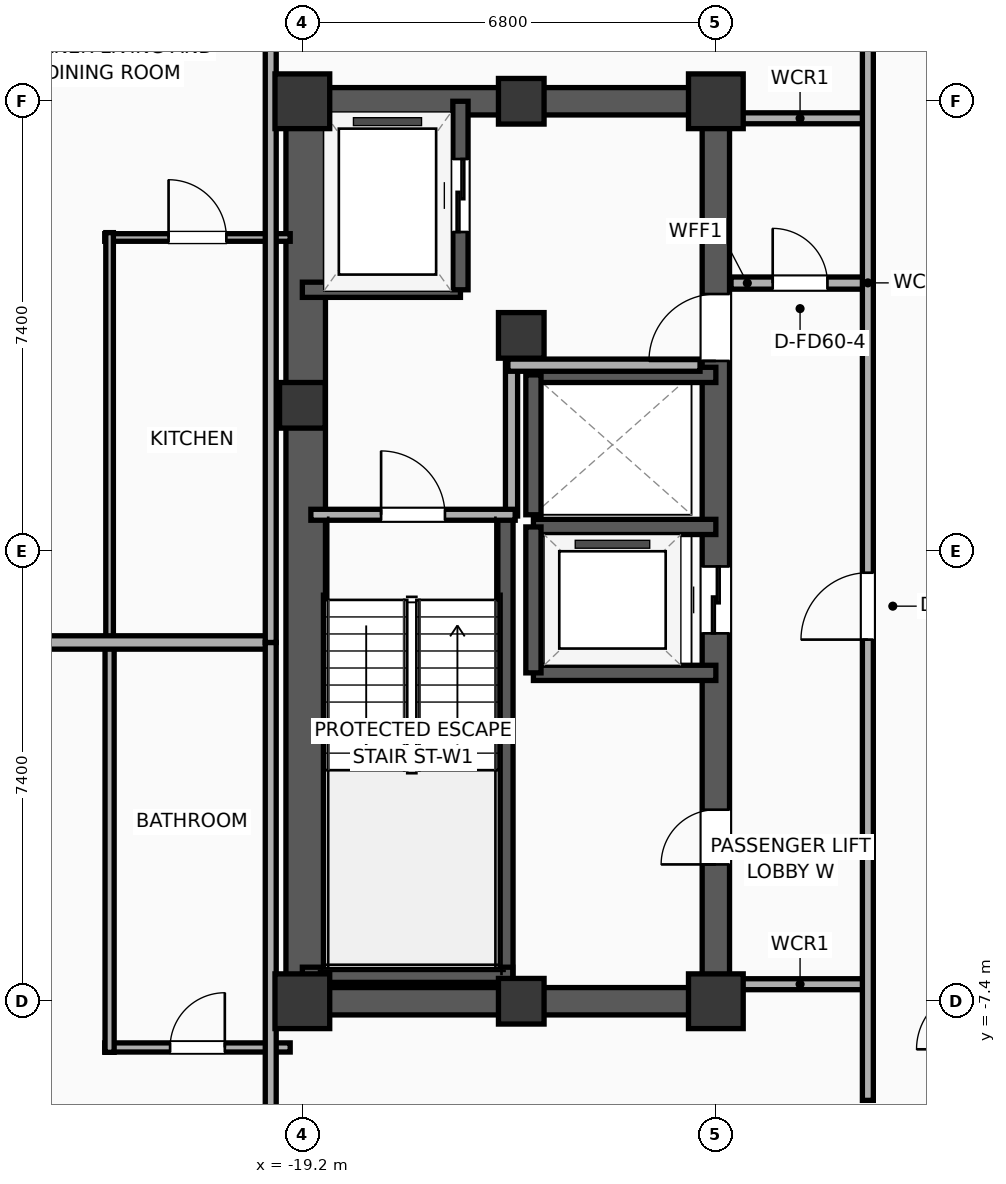
"""IFC4 building model, lengths in metres.
Left out: names, types, materials, properties, quantities, classifications, styles, units other than length and angle.
Written with IfcOpenShell. Run it as: python <this file> out.ifc"""

import sys

from ifc_helpers import new_model, si_unit, direction, frame, frame_2d, origin, origin_2d, place, context, subcontext, project, spatial, rectangle, extrude, element, fill, save


model = new_model("IFC4")
c1 = context("Model", 3, precision=1e-05, world=origin(), true_north=direction((0.0, 1.0)))
c2 = subcontext(c1, "Body", "Model", "MODEL_VIEW")
j1 = project(units=[si_unit("LENGTHUNIT", "METRE"), si_unit("PLANEANGLEUNIT", "RADIAN")], contexts=[c1])
p1 = place(None, origin())
s1 = spatial("IfcSite", under=j1, at=p1, CompositionType="ELEMENT")
p2 = place(p1, origin())
s2 = spatial("IfcBuilding", under=s1, at=p2, CompositionType="ELEMENT")
p3 = place(p2, frame((0.0, 0.0, 159.9)))
s3 = spatial("IfcBuildingStorey", under=s2, at=p3, CompositionType="ELEMENT", Elevation=159.9)
p4 = place(p3, frame((-19.2, -7.4, 0.0), z_axis=(0.0, 0.0, 1.0), x_axis=(1.0, 0.0, 0.0)))
e1 = element("IfcColumn", 1, at=p4, inside=s3, PredefinedType="COLUMN", context=c2, shape_type="SweptSolid", body=[
    extrude(rectangle(XDim=0.9, YDim=0.9, at=origin_2d()), origin(), (0.0, 0.0, 1.0), 3.9),
])
p5 = place(p3, frame((-19.2, 2.4, 0.0), z_axis=(0.0, 0.0, 1.0), x_axis=(1.0, 0.0, 0.0)))
e2 = element("IfcColumn", 2, at=p5, inside=s3, PredefinedType="COLUMN", context=c2, shape_type="SweptSolid", body=[
    extrude(rectangle(XDim=0.75, YDim=0.75, at=origin_2d()), origin(), (0.0, 0.0, 1.0), 3.9),
])
p6 = place(p3, frame((-19.2, 7.4, 0.0), z_axis=(0.0, 0.0, 1.0), x_axis=(1.0, 0.0, 0.0)))
e3 = element("IfcColumn", 3, at=p6, inside=s3, PredefinedType="COLUMN", context=c2, shape_type="SweptSolid", body=[
    extrude(rectangle(XDim=0.9, YDim=0.9, at=origin_2d()), origin(), (0.0, 0.0, 1.0), 3.9),
])
for number, where, z_axis, x_axis in (
    (4, (-15.6, -7.4, 0.0), (0.0, 0.0, 1.0), (1.0, 0.0, 0.0)),
    (5, (-15.6, 7.4, 0.0), (0.0, 0.0, 1.0), (1.0, 0.0, 0.0)),
):
    element("IfcColumn", number, at=place(p3, frame(where, z_axis=z_axis, x_axis=x_axis)), inside=s3, PredefinedType="COLUMN", context=c2, shape_type="SweptSolid", body=[
        extrude(rectangle(XDim=0.75, YDim=0.75, at=origin_2d()), origin(), (0.0, 0.0, 1.0), 3.9),
    ])
p7 = place(p3, frame((-12.4, -7.4, 0.0), z_axis=(0.0, 0.0, 1.0), x_axis=(1.0, 0.0, 0.0)))
e6 = element("IfcColumn", 6, at=p7, inside=s3, PredefinedType="COLUMN", context=c2, shape_type="SweptSolid", body=[
    extrude(rectangle(XDim=0.9, YDim=0.9, at=origin_2d()), origin(), (0.0, 0.0, 1.0), 3.9),
])
p8 = place(p3, frame((-15.6, 3.55, 0.0), z_axis=(0.0, 0.0, 1.0), x_axis=(1.0, 0.0, 0.0)))
e7 = element("IfcColumn", 7, at=p8, inside=s3, PredefinedType="COLUMN", context=c2, shape_type="SweptSolid", body=[
    extrude(rectangle(XDim=0.75, YDim=0.75, at=origin_2d()), origin(), (0.0, 0.0, 1.0), 3.9),
])
p9 = place(p3, frame((-12.4, 7.4, 0.0), z_axis=(0.0, 0.0, 1.0), x_axis=(1.0, 0.0, 0.0)))
e8 = element("IfcColumn", 8, at=p9, inside=s3, PredefinedType="COLUMN", context=c2, shape_type="SweptSolid", body=[
    extrude(rectangle(XDim=0.9, YDim=0.9, at=origin_2d()), origin(), (0.0, 0.0, 1.0), 3.9),
])
for number, where, z_axis, x_axis in (
    (9, (-19.425, -7.4, 0.0), (0.0, 0.0, 1.0), (1.0, 0.0, 0.0)),
    (10, (-19.425, 7.4, 0.0), (0.0, 0.0, 1.0), (1.0, 0.0, 0.0)),
):
    element("IfcWall", number, at=place(p3, frame(where, z_axis=z_axis, x_axis=x_axis)), inside=s3, PredefinedType="SHEAR", context=c2, shape_type="SweptSolid", body=[
        extrude(rectangle(XDim=7.25, YDim=0.45, at=frame_2d((3.625, 0.0))), origin(), (0.0, 0.0, 1.0), 3.65),
    ])
p10 = place(p3, frame((-19.145, -7.4, 0.0), z_axis=(0.0, 0.0, 1.0), x_axis=(0.0, 1.0, 0.0)))
e11 = element("IfcWall", 11, at=p10, inside=s3, PredefinedType="SHEAR", context=c2, shape_type="SweptSolid", body=[
    extrude(rectangle(XDim=14.8, YDim=0.65, at=frame_2d((7.4, 0.0))), origin(), (0.0, 0.0, 1.0), 3.65),
])
p11 = place(p3, frame((-12.4, -7.4, 0.0), z_axis=(0.0, 0.0, 1.0), x_axis=(0.0, 1.0, 0.0)))
e12 = element("IfcWall", 12, at=p11, inside=s3, PredefinedType="SHEAR", context=c2, shape_type="SweptSolid", body=[
    extrude(rectangle(XDim=14.8, YDim=0.45, at=frame_2d((7.4, 0.0))), origin(), (0.0, 0.0, 1.0), 3.65),
])
p12 = place(p11, frame((6.05, 0.0, 0.0)))
e13 = element("IfcOpeningElement", 13, at=p12, cuts=e12, PredefinedType="OPENING", context=c2, shape_type="SweptSolid", body=[
    extrude(rectangle(XDim=1.1, YDim=2.05, at=frame_2d((0.55, 1.025))), frame((0.0, 0.235, 0.0), z_axis=(0.0, -1.0, 0.0), x_axis=(1.0, 0.0, 0.0)), (0.0, 0.0, 1.0), 0.47),
])
p13 = place(p11, frame((10.53, 0.0, 0.0)))
e14 = element("IfcOpeningElement", 14, at=p13, cuts=e12, PredefinedType="OPENING", context=c2, shape_type="SweptSolid", body=[
    extrude(rectangle(XDim=1.1, YDim=2.05, at=frame_2d((0.55, 1.025))), frame((0.0, 0.235, 0.0), z_axis=(0.0, -1.0, 0.0), x_axis=(1.0, 0.0, 0.0)), (0.0, 0.0, 1.0), 0.47),
])
p14 = place(p11, frame((2.25, 0.0, 0.0)))
e15 = element("IfcOpeningElement", 15, at=p14, cuts=e12, PredefinedType="OPENING", context=c2, shape_type="SweptSolid", body=[
    extrude(rectangle(XDim=0.9, YDim=2.05, at=frame_2d((0.45, 1.025))), frame((0.0, 0.235, 0.0), z_axis=(0.0, -1.0, 0.0), x_axis=(1.0, 0.0, 0.0)), (0.0, 0.0, 1.0), 0.47),
])
p15 = place(p3, frame((-15.86, -7.085, 0.0), z_axis=(0.0, 0.0, 1.0), x_axis=(0.0, 1.0, 0.0)))
e16 = element("IfcWall", 16, at=p15, inside=s3, PredefinedType="SOLIDWALL", context=c2, shape_type="SweptSolid", body=[
    extrude(rectangle(XDim=7.685, YDim=0.25, at=frame_2d((3.843, 0.0))), origin(), (0.0, 0.0, 1.0), 3.65),
])
p16 = place(p3, frame((-19.2, -6.965, 0.0), z_axis=(0.0, 0.0, 1.0), x_axis=(1.0, 0.0, 0.0)))
e17 = element("IfcWall", 17, at=p16, inside=s3, PredefinedType="SOLIDWALL", context=c2, shape_type="SweptSolid", body=[
    extrude(rectangle(XDim=3.46, YDim=0.25, at=frame_2d((1.73, 0.0))), origin(), (0.0, 0.0, 1.0), 3.65),
])
p17 = place(p3, frame((-19.2, 4.3, 0.0), z_axis=(0.0, 0.0, 1.0), x_axis=(1.0, 0.0, 0.0)))
e18 = element("IfcWall", 18, at=p17, inside=s3, PredefinedType="SOLIDWALL", context=c2, shape_type="SweptSolid", body=[
    extrude(rectangle(XDim=2.6, YDim=0.25, at=frame_2d((1.3, 0.0))), origin(), (0.0, 0.0, 1.0), 3.65),
])
p18 = place(p3, frame((-16.6, 4.3, 0.0), z_axis=(0.0, 0.0, 1.0), x_axis=(0.0, 1.0, 0.0)))
e19 = element("IfcWall", 19, at=p18, inside=s3, PredefinedType="SOLIDWALL", context=c2, shape_type="SweptSolid", body=[
    extrude(rectangle(XDim=3.1, YDim=0.25, at=frame_2d((1.55, 0.0))), origin(), (0.0, 0.0, 1.0), 3.65),
])
p19 = place(p18, frame((0.95, 0.0, 0.0)))
e20 = element("IfcOpeningElement", 20, at=p19, cuts=e19, PredefinedType="OPENING", context=c2, shape_type="SweptSolid", body=[
    extrude(rectangle(XDim=1.2, YDim=2.05, at=frame_2d((0.6, 1.025))), frame((0.0, 0.135, 0.0), z_axis=(0.0, -1.0, 0.0), x_axis=(1.0, 0.0, 0.0)), (0.0, 0.0, 1.0), 0.27),
])
for number, where, z_axis, x_axis in (
    (21, (-15.4, -2.0, 0.0), (0.0, 0.0, 1.0), (1.0, 0.0, 0.0)),
    (22, (-12.4, 0.4, 0.0), (0.0, 0.0, 1.0), (-1.0, 0.0, 0.0)),
):
    element("IfcWall", number, at=place(p3, frame(where, z_axis=z_axis, x_axis=x_axis)), inside=s3, PredefinedType="SOLIDWALL", context=c2, shape_type="SweptSolid", body=[
        extrude(rectangle(XDim=3.0, YDim=0.25, at=frame_2d((1.5, 0.0))), origin(), (0.0, 0.0, 1.0), 3.65),
    ])
p20 = place(p3, frame((-15.4, 0.4, 0.0), z_axis=(0.0, 0.0, 1.0), x_axis=(0.0, -1.0, 0.0)))
e23 = element("IfcWall", 23, at=p20, inside=s3, PredefinedType="SOLIDWALL", context=c2, shape_type="SweptSolid", body=[
    extrude(rectangle(XDim=2.4, YDim=0.25, at=frame_2d((1.2, 0.0))), origin(), (0.0, 0.0, 1.0), 3.65),
])
p21 = place(p3, frame((-12.4, 2.9, 0.0), z_axis=(0.0, 0.0, 1.0), x_axis=(-1.0, 0.0, 0.0)))
e24 = element("IfcWall", 24, at=p21, inside=s3, PredefinedType="SOLIDWALL", context=c2, shape_type="SweptSolid", body=[
    extrude(rectangle(XDim=3.0, YDim=0.25, at=frame_2d((1.5, 0.0))), origin(), (0.0, 0.0, 1.0), 3.65),
])
p22 = place(p3, frame((-15.4, 2.9, 0.0), z_axis=(0.0, 0.0, 1.0), x_axis=(0.0, -1.0, 0.0)))
e25 = element("IfcWall", 25, at=p22, inside=s3, PredefinedType="SOLIDWALL", context=c2, shape_type="SweptSolid", body=[
    extrude(rectangle(XDim=2.3, YDim=0.25, at=frame_2d((1.15, 0.0))), origin(), (0.0, 0.0, 1.0), 3.65),
])
p23 = place(p3, frame((-15.76, 0.58, 0.0), z_axis=(0.0, 0.0, 1.0), x_axis=(0.0, 1.0, 0.0)))
e26 = element("IfcWall", 26, at=p23, inside=s3, PredefinedType="PARTITIONING", context=c2, shape_type="SweptSolid", body=[
    extrude(rectangle(XDim=2.52, YDim=0.2, at=frame_2d((1.26, 0.0))), origin(), (0.0, 0.0, 1.0), 3.65),
])
p24 = place(p3, frame((-15.82, 3.06, 0.0), z_axis=(0.0, 0.0, 1.0), x_axis=(1.0, 0.0, 0.0)))
e27 = element("IfcWall", 27, at=p24, inside=s3, PredefinedType="PARTITIONING", context=c2, shape_type="SweptSolid", body=[
    extrude(rectangle(XDim=3.16, YDim=0.2, at=frame_2d((1.58, 0.0))), origin(), (0.0, 0.0, 1.0), 3.65),
])
p25 = place(p3, frame((-19.06, 0.6, 0.0), z_axis=(0.0, 0.0, 1.0), x_axis=(1.0, 0.0, 0.0)))
e28 = element("IfcWall", 28, at=p25, inside=s3, PredefinedType="PARTITIONING", context=c2, shape_type="SweptSolid", body=[
    extrude(rectangle(XDim=3.36, YDim=0.18, at=frame_2d((1.68, 0.0))), origin(), (0.0, 0.0, 1.0), 3.65),
])
p26 = place(p25, frame((1.155, 0.0, 0.0)))
e29 = element("IfcOpeningElement", 29, at=p26, cuts=e28, PredefinedType="OPENING", context=c2, shape_type="SweptSolid", body=[
    extrude(rectangle(XDim=1.05, YDim=2.05, at=frame_2d((0.525, 1.025))), frame((0.0, 0.1, 0.0), z_axis=(0.0, -1.0, 0.0), x_axis=(1.0, 0.0, 0.0)), (0.0, 0.0, 1.0), 0.2),
])
p27 = place(p3, frame((-12.15, 4.41, 0.0), z_axis=(0.0, 0.0, 1.0), x_axis=(1.0, 0.0, 0.0)))
e30 = element("IfcWall", 30, at=p27, inside=s3, PredefinedType="PARTITIONING", context=c2, shape_type="SweptSolid", body=[
    extrude(rectangle(XDim=2.27, YDim=0.2, at=frame_2d((1.135, 0.0))), origin(), (0.0, 0.0, 1.0), 3.65),
])
p28 = place(p27, frame((0.685, 0.0, 0.0)))
e31 = element("IfcOpeningElement", 31, at=p28, cuts=e30, PredefinedType="OPENING", context=c2, shape_type="SweptSolid", body=[
    extrude(rectangle(XDim=0.9, YDim=2.05, at=frame_2d((0.45, 1.025))), frame((0.0, 0.11, 0.0), z_axis=(0.0, -1.0, 0.0), x_axis=(1.0, 0.0, 0.0)), (0.0, 0.0, 1.0), 0.22),
])
for number, where, z_axis, x_axis in (
    (32, (-12.15, 7.12, 0.0), (0.0, 0.0, 1.0), (1.0, 0.0, 0.0)),
    (33, (-12.15, -7.12, 0.0), (0.0, 0.0, 1.0), (1.0, 0.0, 0.0)),
):
    element("IfcWall", number, at=place(p3, frame(where, z_axis=z_axis, x_axis=x_axis)), inside=s3, PredefinedType="PARTITIONING", context=c2, shape_type="SweptSolid", body=[
        extrude(rectangle(XDim=2.27, YDim=0.18, at=frame_2d((1.135, 0.0))), origin(), (0.0, 0.0, 1.0), 3.65),
    ])
p29 = place(p3, frame((-9.9, -9.03, 0.0), z_axis=(0.0, 0.0, 1.0), x_axis=(0.0, 1.0, 0.0)))
e34 = element("IfcWall", 34, at=p29, inside=s3, PredefinedType="PARTITIONING", context=c2, shape_type="SweptSolid", body=[
    extrude(rectangle(XDim=18.06, YDim=0.18, at=frame_2d((9.03, 0.0))), origin(), (0.0, 0.0, 1.0), 3.65),
])
p30 = place(p29, frame((7.577, 0.0, 0.0)))
e35 = element("IfcOpeningElement", 35, at=p30, cuts=e34, PredefinedType="OPENING", context=c2, shape_type="SweptSolid", body=[
    extrude(rectangle(XDim=1.1, YDim=2.05, at=frame_2d((0.55, 1.025))), frame((0.0, 0.1, 0.0), z_axis=(0.0, -1.0, 0.0), x_axis=(1.0, 0.0, 0.0)), (0.0, 0.0, 1.0), 0.2),
])
p31 = place(p3, frame((-22.45, -8.16, 0.0), z_axis=(0.0, 0.0, 1.0), x_axis=(1.0, 0.0, 0.0)))
e36 = element("IfcWall", 36, at=p31, inside=s3, PredefinedType="PLUMBINGWALL", context=c2, shape_type="SweptSolid", body=[
    extrude(rectangle(XDim=3.05, YDim=0.15, at=frame_2d((1.525, 0.0))), origin(), (0.0, 0.0, 1.0), 3.04),
])
p32 = place(p31, frame((1.075, 0.0, 0.0)))
e37 = element("IfcOpeningElement", 37, at=p32, cuts=e36, PredefinedType="OPENING", context=c2, shape_type="SweptSolid", body=[
    extrude(rectangle(XDim=0.9, YDim=2.05, at=frame_2d((0.45, 1.025))), frame((0.0, 0.085, 0.0), z_axis=(0.0, -1.0, 0.0), x_axis=(1.0, 0.0, 0.0)), (0.0, 0.0, 1.0), 0.17),
])
p33 = place(p3, frame((-22.37, -8.24, 0.0), z_axis=(0.0, 0.0, 1.0), x_axis=(0.0, 1.0, 0.0)))
e38 = element("IfcWall", 38, at=p33, inside=s3, PredefinedType="PLUMBINGWALL", context=c2, shape_type="SweptSolid", body=[
    extrude(rectangle(XDim=6.72, YDim=0.15, at=frame_2d((3.36, 0.0))), origin(), (0.0, 0.0, 1.0), 3.65),
])
p34 = place(p3, frame((-22.45, 5.16, 0.0), z_axis=(0.0, 0.0, 1.0), x_axis=(1.0, 0.0, 0.0)))
e39 = element("IfcWall", 39, at=p34, inside=s3, PredefinedType="PARTITIONING", context=c2, shape_type="SweptSolid", body=[
    extrude(rectangle(XDim=3.05, YDim=0.125, at=frame_2d((1.525, 0.0))), origin(), (0.0, 0.0, 1.0), 3.65),
])
p35 = place(p34, frame((1.05, 0.0, 0.0)))
e40 = element("IfcOpeningElement", 40, at=p35, cuts=e39, PredefinedType="OPENING", context=c2, shape_type="SweptSolid", body=[
    extrude(rectangle(XDim=0.95, YDim=2.05, at=frame_2d((0.475, 1.025))), frame((0.0, 0.073, 0.0), z_axis=(0.0, -1.0, 0.0), x_axis=(1.0, 0.0, 0.0)), (0.0, 0.0, 1.0), 0.145),
])
p36 = place(p3, frame((-22.37, -1.48, 0.0), z_axis=(0.0, 0.0, 1.0), x_axis=(0.0, 1.0, 0.0)))
e41 = element("IfcWall", 41, at=p36, inside=s3, PredefinedType="PARTITIONING", context=c2, shape_type="SweptSolid", body=[
    extrude(rectangle(XDim=6.72, YDim=0.125, at=frame_2d((3.36, 0.0))), origin(), (0.0, 0.0, 1.0), 3.65),
])
p37 = place(p3, frame((-19.72, -1.5, 0.0), z_axis=(0.0, 0.0, 1.0), x_axis=(-1.0, 0.0, 0.0)))
e42 = element("IfcWall", 42, at=p37, inside=s3, PredefinedType="PARTITIONING", context=c2, shape_type="SweptSolid", body=[
    extrude(rectangle(XDim=13.179, YDim=0.22, at=frame_2d((6.589, 0.0))), origin(), (0.0, 0.0, 1.0), 3.65),
])
p38 = place(p3, frame((-19.72, -22.678, 0.0), z_axis=(0.0, 0.0, 1.0), x_axis=(0.0, 1.0, 0.0)))
e43 = element("IfcWall", 43, at=p38, inside=s3, PredefinedType="PARTITIONING", context=c2, shape_type="SweptSolid", body=[
    extrude(rectangle(XDim=21.178, YDim=0.18, at=frame_2d((10.589, 0.0))), origin(), (0.0, 0.0, 1.0), 3.65),
])
p39 = place(p38, frame((12.547, 0.0, 0.0)))
e44 = element("IfcOpeningElement", 44, at=p39, cuts=e43, PredefinedType="OPENING", context=c2, shape_type="SweptSolid", body=[
    extrude(rectangle(XDim=0.9, YDim=2.05, at=frame_2d((0.45, 1.025))), frame((0.0, 0.1, 0.0), z_axis=(0.0, -1.0, 0.0), x_axis=(1.0, 0.0, 0.0)), (0.0, 0.0, 1.0), 0.2),
])
p40 = place(p3, frame((-19.72, -1.5, 0.0), z_axis=(0.0, 0.0, 1.0), x_axis=(0.0, 1.0, 0.0)))
e45 = element("IfcWall", 45, at=p40, inside=s3, PredefinedType="PARTITIONING", context=c2, shape_type="SweptSolid", body=[
    extrude(rectangle(XDim=19.505, YDim=0.18, at=frame_2d((9.752, 0.0))), origin(), (0.0, 0.0, 1.0), 3.04),
])
p41 = place(p40, frame((10.73, 0.0, 0.0)))
e46 = element("IfcOpeningElement", 46, at=p41, cuts=e45, PredefinedType="OPENING", context=c2, shape_type="SweptSolid", body=[
    extrude(rectangle(XDim=0.9, YDim=2.05, at=frame_2d((0.45, 1.025))), frame((0.0, 0.1, 0.0), z_axis=(0.0, -1.0, 0.0), x_axis=(1.0, 0.0, 0.0)), (0.0, 0.0, 1.0), 0.2),
])
p42 = place(p19, origin())
e47 = element("IfcDoor", 47, at=p42, inside=s3, OperationType="SLIDING_TO_LEFT", PredefinedType="DOOR", context=c2, shape_type="SweptSolid", body=[
    extrude(rectangle(XDim=1.2, YDim=2.05, at=frame_2d((0.6, 1.025))), frame((0.0, 0.025, 0.0), z_axis=(0.0, -1.0, 0.0), x_axis=(1.0, 0.0, 0.0)), (0.0, 0.0, 1.0), 0.05),
])
fill(e20, e47)
p43 = place(p12, origin())
e48 = element("IfcDoor", 48, at=p43, inside=s3, OperationType="SLIDING_TO_LEFT", PredefinedType="DOOR", context=c2, shape_type="SweptSolid", body=[
    extrude(rectangle(XDim=1.1, YDim=2.05, at=frame_2d((0.55, 1.025))), frame((0.0, 0.025, 0.0), z_axis=(0.0, -1.0, 0.0), x_axis=(1.0, 0.0, 0.0)), (0.0, 0.0, 1.0), 0.05),
])
fill(e13, e48)
p44 = place(p26, origin())
e49 = element("IfcDoor", 49, at=p44, inside=s3, OperationType="SINGLE_SWING_LEFT", PredefinedType="DOOR", context=c2, shape_type="SweptSolid", body=[
    extrude(rectangle(XDim=1.05, YDim=2.05, at=frame_2d((0.525, 1.025))), frame((0.0, 0.025, 0.0), z_axis=(0.0, -1.0, 0.0), x_axis=(1.0, 0.0, 0.0)), (0.0, 0.0, 1.0), 0.05),
])
fill(e29, e49)
p45 = place(p28, origin())
e50 = element("IfcDoor", 50, at=p45, inside=s3, OperationType="SINGLE_SWING_LEFT", PredefinedType="DOOR", context=c2, shape_type="SweptSolid", body=[
    extrude(rectangle(XDim=0.9, YDim=2.05, at=frame_2d((0.45, 1.025))), frame((0.0, 0.025, 0.0), z_axis=(0.0, -1.0, 0.0), x_axis=(1.0, 0.0, 0.0)), (0.0, 0.0, 1.0), 0.05),
])
fill(e31, e50)
p46 = place(p30, origin())
e51 = element("IfcDoor", 51, at=p46, inside=s3, OperationType="SINGLE_SWING_LEFT", PredefinedType="DOOR", context=c2, shape_type="SweptSolid", body=[
    extrude(rectangle(XDim=1.1, YDim=2.05, at=frame_2d((0.55, 1.025))), frame((0.0, 0.025, 0.0), z_axis=(0.0, -1.0, 0.0), x_axis=(1.0, 0.0, 0.0)), (0.0, 0.0, 1.0), 0.05),
])
fill(e35, e51)
p47 = place(p32, origin())
e52 = element("IfcDoor", 52, at=p47, inside=s3, OperationType="SINGLE_SWING_RIGHT", PredefinedType="DOOR", context=c2, shape_type="SweptSolid", body=[
    extrude(rectangle(XDim=0.9, YDim=2.05, at=frame_2d((0.45, 1.025))), frame((0.0, 0.025, 0.0), z_axis=(0.0, -1.0, 0.0), x_axis=(1.0, 0.0, 0.0)), (0.0, 0.0, 1.0), 0.05),
])
fill(e37, e52)
p48 = place(p35, origin())
e53 = element("IfcDoor", 53, at=p48, inside=s3, OperationType="SINGLE_SWING_LEFT", PredefinedType="DOOR", context=c2, shape_type="SweptSolid", body=[
    extrude(rectangle(XDim=0.95, YDim=2.05, at=frame_2d((0.475, 1.025))), frame((0.0, 0.025, 0.0), z_axis=(0.0, -1.0, 0.0), x_axis=(1.0, 0.0, 0.0)), (0.0, 0.0, 1.0), 0.05),
])
fill(e40, e53)
p49 = place(p13, origin())
e54 = element("IfcDoor", 54, at=p49, inside=s3, OperationType="SINGLE_SWING_LEFT", PredefinedType="DOOR", context=c2, shape_type="SweptSolid", body=[
    extrude(rectangle(XDim=1.1, YDim=2.05, at=frame_2d((0.55, 1.025))), frame((0.0, 0.025, 0.0), z_axis=(0.0, -1.0, 0.0), x_axis=(1.0, 0.0, 0.0)), (0.0, 0.0, 1.0), 0.05),
])
fill(e14, e54)
p50 = place(p14, origin())
e55 = element("IfcDoor", 55, at=p50, inside=s3, OperationType="SINGLE_SWING_LEFT", PredefinedType="DOOR", context=c2, shape_type="SweptSolid", body=[
    extrude(rectangle(XDim=0.9, YDim=2.05, at=frame_2d((0.45, 1.025))), frame((0.0, 0.025, 0.0), z_axis=(0.0, -1.0, 0.0), x_axis=(1.0, 0.0, 0.0)), (0.0, 0.0, 1.0), 0.05),
])
fill(e15, e55)
save(model, sys.argv[1])
